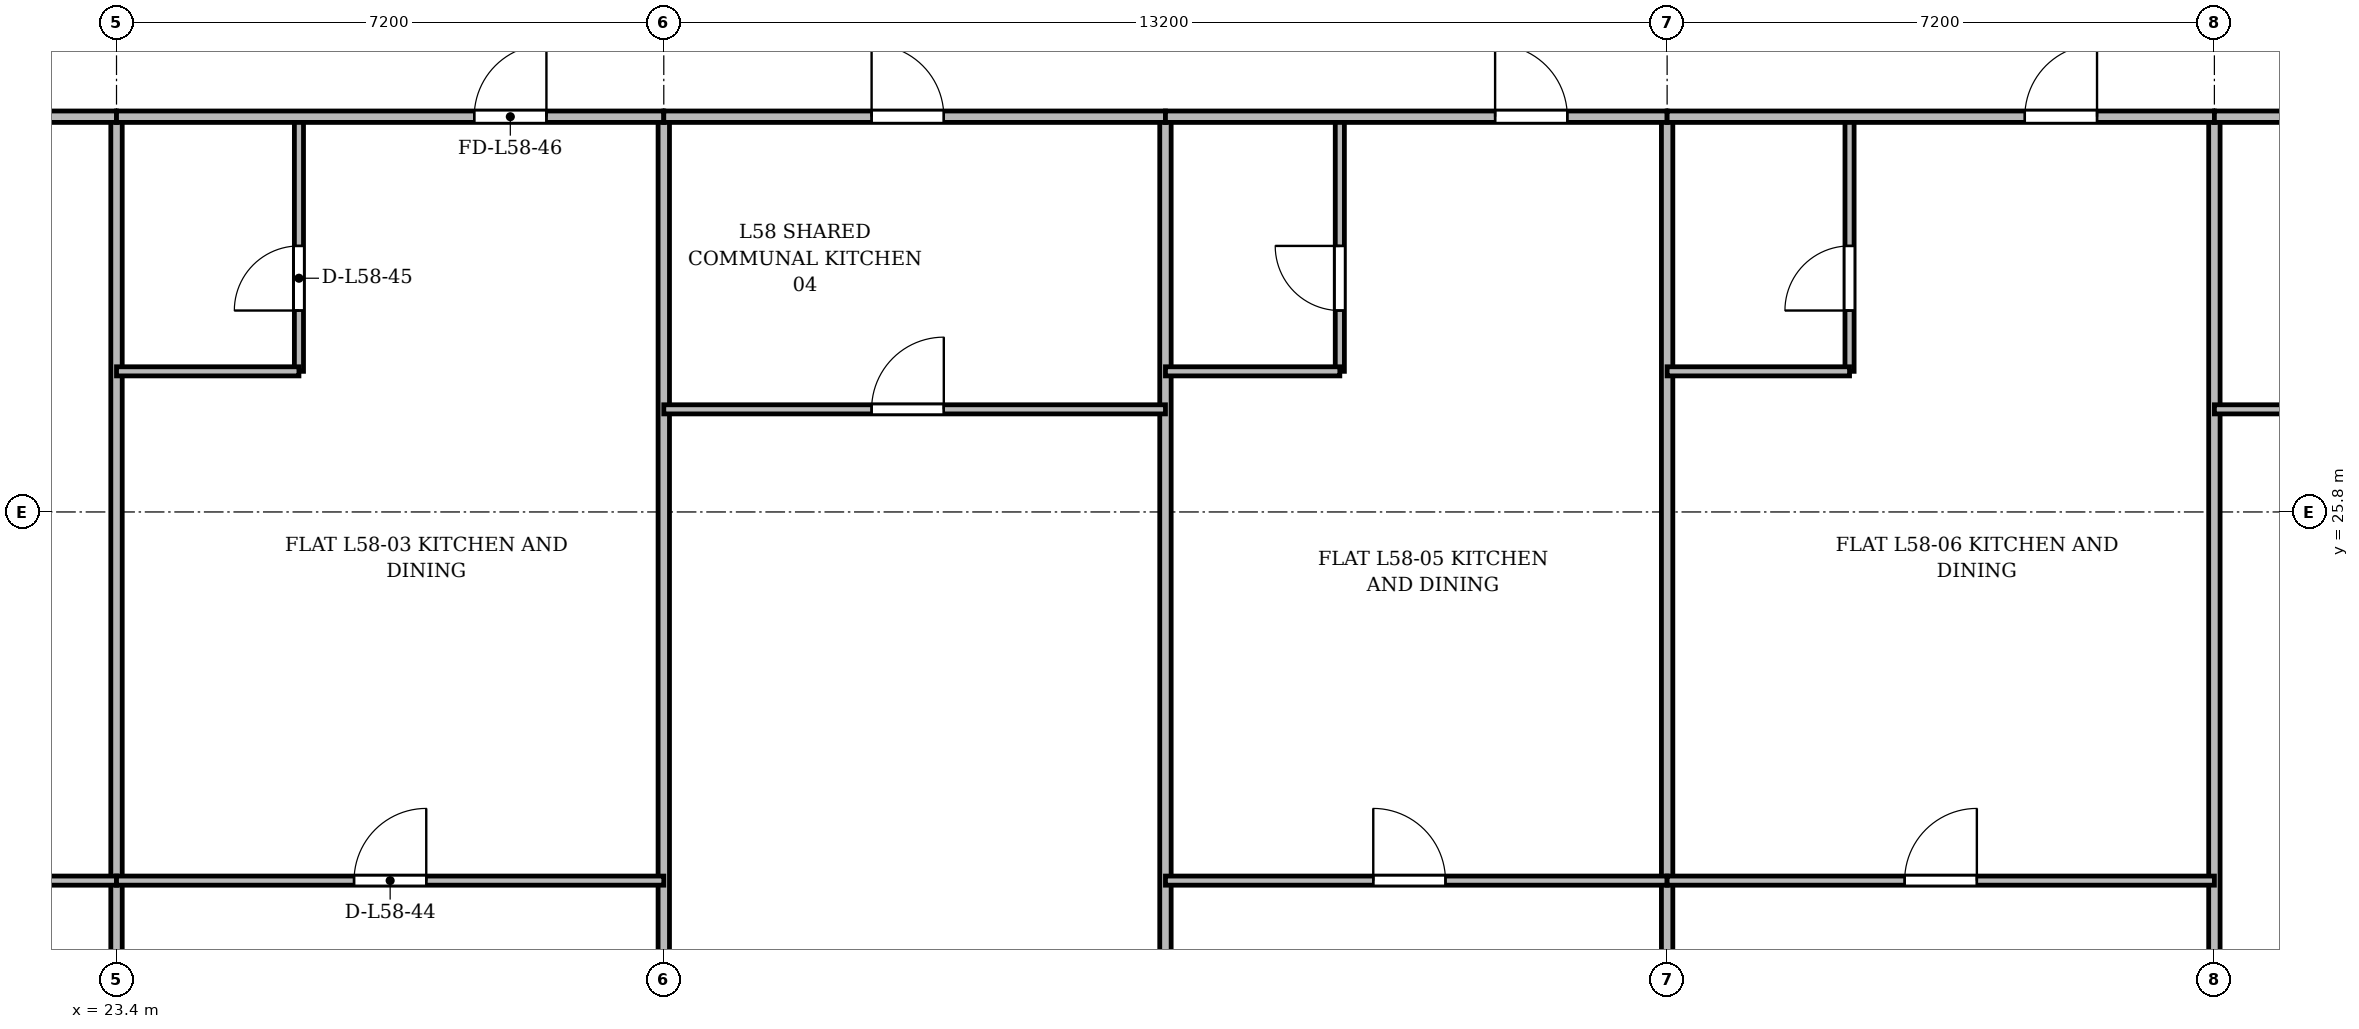
"""IFC4 building model, lengths in metres.
Left out: names, types, materials, properties, quantities, classifications, styles, units other than length and angle.
Written with IfcOpenShell. Run it as: python <this file> out.ifc"""

import sys

from ifc_helpers import new_model, si_unit, direction, frame, frame_2d, origin, place, context, subcontext, project, spatial, rectangle, extrude, source, transform, mapped, element, fill, save


model = new_model("IFC4")
c1 = context("Model", 3, precision=1e-05, world=origin(), true_north=direction((0.0, 1.0)))
c2 = subcontext(c1, "Body", "Model", "MODEL_VIEW")
j1 = project(units=[si_unit("LENGTHUNIT", "METRE"), si_unit("PLANEANGLEUNIT", "RADIAN")], contexts=[c1])
p1 = place(None, origin())
s1 = spatial("IfcSite", under=j1, at=p1, CompositionType="ELEMENT")
p2 = place(p1, origin())
s2 = spatial("IfcBuilding", under=s1, at=p2, CompositionType="ELEMENT")
p3 = place(p2, frame((0.0, 0.0, 222.9)))
s3 = spatial("IfcBuildingStorey", under=s2, at=p3, CompositionType="ELEMENT", Elevation=222.9)
for number, where, z_axis, x_axis in (
    (1, (23.4, 3.625, 0.0), (0.0, 0.0, 1.0), (0.0, 1.0, 0.0)),
    (2, (30.6, 3.625, 0.0), (0.0, 0.0, 1.0), (0.0, 1.0, 0.0)),
):
    element("IfcWall", number, at=place(p3, frame(where, z_axis=z_axis, x_axis=x_axis)), inside=s3, PredefinedType="PARTITIONING", context=c2, shape_type="SweptSolid", body=[
        extrude(rectangle(XDim=27.375, YDim=0.15, at=frame_2d((13.688, 0.0))), origin(), (0.0, 0.0, 1.0), 2.86),
    ])
p4 = place(p3, frame((37.2, 3.625, 0.0), z_axis=(0.0, 0.0, 1.0), x_axis=(0.0, 1.0, 0.0)))
e3 = element("IfcWall", 3, at=p4, inside=s3, PredefinedType="PARTITIONING", context=c2, shape_type="SweptSolid", body=[
    extrude(rectangle(XDim=27.375, YDim=0.15, at=frame_2d((13.688, 0.0))), origin(), (0.0, 0.0, 1.0), 2.91),
])
for number, where, z_axis, x_axis in (
    (4, (43.8, 3.625, 0.0), (0.0, 0.0, 1.0), (0.0, 1.0, 0.0)),
    (5, (51.0, 3.625, 0.0), (0.0, 0.0, 1.0), (0.0, 1.0, 0.0)),
):
    element("IfcWall", number, at=place(p3, frame(where, z_axis=z_axis, x_axis=x_axis)), inside=s3, PredefinedType="PARTITIONING", context=c2, shape_type="SweptSolid", body=[
        extrude(rectangle(XDim=27.375, YDim=0.15, at=frame_2d((13.688, 0.0))), origin(), (0.0, 0.0, 1.0), 2.86),
    ])
p5 = place(p3, frame((15.6, 20.95, 0.0), z_axis=(0.0, 0.0, 1.0), x_axis=(1.0, 0.0, 0.0)))
e6 = element("IfcWall", 6, at=p5, inside=s3, PredefinedType="PARTITIONING", context=c2, shape_type="SweptSolid", body=[
    extrude(rectangle(XDim=7.8, YDim=0.12, at=frame_2d((3.9, 0.0))), origin(), (0.0, 0.0, 1.0), 2.86),
])
p6 = place(p5, frame((3.333, 0.0, 0.0)))
e7 = element("IfcOpeningElement", 7, at=p6, cuts=e6, PredefinedType="OPENING", context=c2, shape_type="SweptSolid", body=[
    extrude(rectangle(XDim=0.95, YDim=2.15, at=frame_2d((0.475, 1.075))), frame((0.0, 0.07, 0.0), z_axis=(0.0, -1.0, 0.0), x_axis=(1.0, 0.0, 0.0)), (0.0, 0.0, 1.0), 0.14),
])
p7 = place(p3, frame((15.6, 31.0, 0.0), z_axis=(0.0, 0.0, 1.0), x_axis=(1.0, 0.0, 0.0)))
e8 = element("IfcWall", 8, at=p7, inside=s3, PredefinedType="PARTITIONING", context=c2, shape_type="SweptSolid", body=[
    extrude(rectangle(XDim=7.8, YDim=0.15, at=frame_2d((3.9, 0.0))), origin(), (0.0, 0.0, 1.0), 2.86),
])
p8 = place(p7, frame((5.172, 0.0, 0.0)))
e9 = element("IfcOpeningElement", 9, at=p8, cuts=e8, PredefinedType="OPENING", context=c2, shape_type="SweptSolid", body=[
    extrude(rectangle(XDim=0.95, YDim=2.15, at=frame_2d((0.475, 1.075))), frame((0.0, 0.085, 0.0), z_axis=(0.0, -1.0, 0.0), x_axis=(1.0, 0.0, 0.0)), (0.0, 0.0, 1.0), 0.17),
])
p9 = place(p3, frame((23.4, 20.95, 0.0), z_axis=(0.0, 0.0, 1.0), x_axis=(1.0, 0.0, 0.0)))
e10 = element("IfcWall", 10, at=p9, inside=s3, PredefinedType="PARTITIONING", context=c2, shape_type="SweptSolid", body=[
    extrude(rectangle(XDim=7.2, YDim=0.12, at=frame_2d((3.6, 0.0))), origin(), (0.0, 0.0, 1.0), 2.86),
])
p10 = place(p9, frame((3.125, 0.0, 0.0)))
e11 = element("IfcOpeningElement", 11, at=p10, cuts=e10, PredefinedType="OPENING", context=c2, shape_type="SweptSolid", body=[
    extrude(rectangle(XDim=0.95, YDim=2.15, at=frame_2d((0.475, 1.075))), frame((0.0, 0.07, 0.0), z_axis=(0.0, -1.0, 0.0), x_axis=(1.0, 0.0, 0.0)), (0.0, 0.0, 1.0), 0.14),
])
p11 = place(p3, frame((25.8, 27.65, 0.0), z_axis=(0.0, 0.0, 1.0), x_axis=(0.0, 1.0, 0.0)))
e12 = element("IfcWall", 12, at=p11, inside=s3, PredefinedType="PARTITIONING", context=c2, shape_type="SweptSolid", body=[
    extrude(rectangle(XDim=3.35, YDim=0.12, at=frame_2d((1.675, 0.0))), origin(), (0.0, 0.0, 1.0), 3.36),
])
p12 = place(p11, frame((0.8, 0.0, 0.0)))
e13 = element("IfcOpeningElement", 13, at=p12, cuts=e12, PredefinedType="OPENING", context=c2, shape_type="SweptSolid", body=[
    extrude(rectangle(XDim=0.85, YDim=2.1, at=frame_2d((0.425, 1.05))), frame((0.0, 0.07, 0.0), z_axis=(0.0, -1.0, 0.0), x_axis=(1.0, 0.0, 0.0)), (0.0, 0.0, 1.0), 0.14),
])
p13 = place(p3, frame((23.4, 27.65, 0.0), z_axis=(0.0, 0.0, 1.0), x_axis=(1.0, 0.0, 0.0)))
e14 = element("IfcWall", 14, at=p13, inside=s3, PredefinedType="PARTITIONING", context=c2, shape_type="SweptSolid", body=[
    extrude(rectangle(XDim=2.4, YDim=0.12, at=frame_2d((1.2, 0.0))), origin(), (0.0, 0.0, 1.0), 2.86),
])
p14 = place(p3, frame((23.4, 31.0, 0.0), z_axis=(0.0, 0.0, 1.0), x_axis=(1.0, 0.0, 0.0)))
e15 = element("IfcWall", 15, at=p14, inside=s3, PredefinedType="PARTITIONING", context=c2, shape_type="SweptSolid", body=[
    extrude(rectangle(XDim=7.2, YDim=0.15, at=frame_2d((3.6, 0.0))), origin(), (0.0, 0.0, 1.0), 2.86),
])
p15 = place(p14, frame((4.706, 0.0, 0.0)))
e16 = element("IfcOpeningElement", 16, at=p15, cuts=e15, PredefinedType="OPENING", context=c2, shape_type="SweptSolid", body=[
    extrude(rectangle(XDim=0.95, YDim=2.15, at=frame_2d((0.475, 1.075))), frame((0.0, 0.085, 0.0), z_axis=(0.0, -1.0, 0.0), x_axis=(1.0, 0.0, 0.0)), (0.0, 0.0, 1.0), 0.17),
])
p16 = place(p3, frame((30.6, 31.0, 0.0), z_axis=(0.0, 0.0, 1.0), x_axis=(1.0, 0.0, 0.0)))
e17 = element("IfcWall", 17, at=p16, inside=s3, PredefinedType="PARTITIONING", context=c2, shape_type="SweptSolid", body=[
    extrude(rectangle(XDim=6.6, YDim=0.15, at=frame_2d((3.3, 0.0))), origin(), (0.0, 0.0, 1.0), 2.86),
])
p17 = place(p16, frame((2.734, 0.0, 0.0)))
e18 = element("IfcOpeningElement", 18, at=p17, cuts=e17, PredefinedType="OPENING", context=c2, shape_type="SweptSolid", body=[
    extrude(rectangle(XDim=0.95, YDim=2.15, at=frame_2d((0.475, 1.075))), frame((0.0, 0.085, 0.0), z_axis=(0.0, -1.0, 0.0), x_axis=(1.0, 0.0, 0.0)), (0.0, 0.0, 1.0), 0.17),
])
p18 = place(p3, frame((30.6, 27.15, 0.0), z_axis=(0.0, 0.0, 1.0), x_axis=(1.0, 0.0, 0.0)))
e19 = element("IfcWall", 19, at=p18, inside=s3, PredefinedType="PARTITIONING", context=c2, shape_type="SweptSolid", body=[
    extrude(rectangle(XDim=6.6, YDim=0.12, at=frame_2d((3.3, 0.0))), origin(), (0.0, 0.0, 1.0), 2.86),
])
p19 = place(p18, frame((2.734, 0.0, 0.0)))
e20 = element("IfcOpeningElement", 20, at=p19, cuts=e19, PredefinedType="OPENING", context=c2, shape_type="SweptSolid", body=[
    extrude(rectangle(XDim=0.95, YDim=2.15, at=frame_2d((0.475, 1.075))), frame((0.0, 0.07, 0.0), z_axis=(0.0, -1.0, 0.0), x_axis=(1.0, 0.0, 0.0)), (0.0, 0.0, 1.0), 0.14),
])
p20 = place(p3, frame((37.2, 20.95, 0.0), z_axis=(0.0, 0.0, 1.0), x_axis=(1.0, 0.0, 0.0)))
e21 = element("IfcWall", 21, at=p20, inside=s3, PredefinedType="PARTITIONING", context=c2, shape_type="SweptSolid", body=[
    extrude(rectangle(XDim=6.6, YDim=0.12, at=frame_2d((3.3, 0.0))), origin(), (0.0, 0.0, 1.0), 2.86),
])
p21 = place(p20, frame((2.734, 0.0, 0.0)))
e22 = element("IfcOpeningElement", 22, at=p21, cuts=e21, PredefinedType="OPENING", context=c2, shape_type="SweptSolid", body=[
    extrude(rectangle(XDim=0.95, YDim=2.15, at=frame_2d((0.475, 1.075))), frame((0.0, 0.07, 0.0), z_axis=(0.0, -1.0, 0.0), x_axis=(1.0, 0.0, 0.0)), (0.0, 0.0, 1.0), 0.14),
])
p22 = place(p3, frame((39.494, 27.65, 0.0), z_axis=(0.0, 0.0, 1.0), x_axis=(0.0, 1.0, 0.0)))
e23 = element("IfcWall", 23, at=p22, inside=s3, PredefinedType="PARTITIONING", context=c2, shape_type="SweptSolid", body=[
    extrude(rectangle(XDim=3.35, YDim=0.12, at=frame_2d((1.675, 0.0))), origin(), (0.0, 0.0, 1.0), 3.36),
])
p23 = place(p22, frame((0.8, 0.0, 0.0)))
e24 = element("IfcOpeningElement", 24, at=p23, cuts=e23, PredefinedType="OPENING", context=c2, shape_type="SweptSolid", body=[
    extrude(rectangle(XDim=0.85, YDim=2.1, at=frame_2d((0.425, 1.05))), frame((0.0, 0.07, 0.0), z_axis=(0.0, -1.0, 0.0), x_axis=(1.0, 0.0, 0.0)), (0.0, 0.0, 1.0), 0.14),
])
p24 = place(p3, frame((37.2, 27.65, 0.0), z_axis=(0.0, 0.0, 1.0), x_axis=(1.0, 0.0, 0.0)))
e25 = element("IfcWall", 25, at=p24, inside=s3, PredefinedType="PARTITIONING", context=c2, shape_type="SweptSolid", body=[
    extrude(rectangle(XDim=2.294, YDim=0.12, at=frame_2d((1.147, 0.0))), origin(), (0.0, 0.0, 1.0), 3.36),
])
p25 = place(p3, frame((37.2, 31.0, 0.0), z_axis=(0.0, 0.0, 1.0), x_axis=(1.0, 0.0, 0.0)))
e26 = element("IfcWall", 26, at=p25, inside=s3, PredefinedType="PARTITIONING", context=c2, shape_type="SweptSolid", body=[
    extrude(rectangle(XDim=6.6, YDim=0.15, at=frame_2d((3.3, 0.0))), origin(), (0.0, 0.0, 1.0), 2.86),
])
p26 = place(p25, frame((4.337, 0.0, 0.0)))
e27 = element("IfcOpeningElement", 27, at=p26, cuts=e26, PredefinedType="OPENING", context=c2, shape_type="SweptSolid", body=[
    extrude(rectangle(XDim=0.95, YDim=2.15, at=frame_2d((0.475, 1.075))), frame((0.0, 0.085, 0.0), z_axis=(0.0, -1.0, 0.0), x_axis=(1.0, 0.0, 0.0)), (0.0, 0.0, 1.0), 0.17),
])
p27 = place(p3, frame((43.8, 20.95, 0.0), z_axis=(0.0, 0.0, 1.0), x_axis=(1.0, 0.0, 0.0)))
e28 = element("IfcWall", 28, at=p27, inside=s3, PredefinedType="PARTITIONING", context=c2, shape_type="SweptSolid", body=[
    extrude(rectangle(XDim=7.2, YDim=0.12, at=frame_2d((3.6, 0.0))), origin(), (0.0, 0.0, 1.0), 2.86),
])
p28 = place(p27, frame((3.125, 0.0, 0.0)))
e29 = element("IfcOpeningElement", 29, at=p28, cuts=e28, PredefinedType="OPENING", context=c2, shape_type="SweptSolid", body=[
    extrude(rectangle(XDim=0.95, YDim=2.15, at=frame_2d((0.475, 1.075))), frame((0.0, 0.07, 0.0), z_axis=(0.0, -1.0, 0.0), x_axis=(1.0, 0.0, 0.0)), (0.0, 0.0, 1.0), 0.14),
])
p29 = place(p3, frame((46.2, 27.65, 0.0), z_axis=(0.0, 0.0, 1.0), x_axis=(0.0, 1.0, 0.0)))
e30 = element("IfcWall", 30, at=p29, inside=s3, PredefinedType="PARTITIONING", context=c2, shape_type="SweptSolid", body=[
    extrude(rectangle(XDim=3.35, YDim=0.12, at=frame_2d((1.675, 0.0))), origin(), (0.0, 0.0, 1.0), 3.36),
])
p30 = place(p29, frame((0.8, 0.0, 0.0)))
e31 = element("IfcOpeningElement", 31, at=p30, cuts=e30, PredefinedType="OPENING", context=c2, shape_type="SweptSolid", body=[
    extrude(rectangle(XDim=0.85, YDim=2.1, at=frame_2d((0.425, 1.05))), frame((0.0, 0.07, 0.0), z_axis=(0.0, -1.0, 0.0), x_axis=(1.0, 0.0, 0.0)), (0.0, 0.0, 1.0), 0.14),
])
p31 = place(p3, frame((43.8, 27.65, 0.0), z_axis=(0.0, 0.0, 1.0), x_axis=(1.0, 0.0, 0.0)))
e32 = element("IfcWall", 32, at=p31, inside=s3, PredefinedType="PARTITIONING", context=c2, shape_type="SweptSolid", body=[
    extrude(rectangle(XDim=2.4, YDim=0.12, at=frame_2d((1.2, 0.0))), origin(), (0.0, 0.0, 1.0), 2.86),
])
p32 = place(p3, frame((43.8, 31.0, 0.0), z_axis=(0.0, 0.0, 1.0), x_axis=(1.0, 0.0, 0.0)))
e33 = element("IfcWall", 33, at=p32, inside=s3, PredefinedType="PARTITIONING", context=c2, shape_type="SweptSolid", body=[
    extrude(rectangle(XDim=7.2, YDim=0.15, at=frame_2d((3.6, 0.0))), origin(), (0.0, 0.0, 1.0), 2.86),
])
p33 = place(p32, frame((4.706, 0.0, 0.0)))
e34 = element("IfcOpeningElement", 34, at=p33, cuts=e33, PredefinedType="OPENING", context=c2, shape_type="SweptSolid", body=[
    extrude(rectangle(XDim=0.95, YDim=2.15, at=frame_2d((0.475, 1.075))), frame((0.0, 0.085, 0.0), z_axis=(0.0, -1.0, 0.0), x_axis=(1.0, 0.0, 0.0)), (0.0, 0.0, 1.0), 0.17),
])
p34 = place(p3, frame((51.0, 31.0, 0.0), z_axis=(0.0, 0.0, 1.0), x_axis=(1.0, 0.0, 0.0)))
e35 = element("IfcWall", 35, at=p34, inside=s3, PredefinedType="PARTITIONING", context=c2, shape_type="SweptSolid", body=[
    extrude(rectangle(XDim=7.8, YDim=0.15, at=frame_2d((3.9, 0.0))), origin(), (0.0, 0.0, 1.0), 2.86),
])
p35 = place(p34, frame((3.333, 0.0, 0.0)))
e36 = element("IfcOpeningElement", 36, at=p35, cuts=e35, PredefinedType="OPENING", context=c2, shape_type="SweptSolid", body=[
    extrude(rectangle(XDim=0.95, YDim=2.15, at=frame_2d((0.475, 1.075))), frame((0.0, 0.085, 0.0), z_axis=(0.0, -1.0, 0.0), x_axis=(1.0, 0.0, 0.0)), (0.0, 0.0, 1.0), 0.17),
])
p36 = place(p3, frame((51.0, 27.15, 0.0), z_axis=(0.0, 0.0, 1.0), x_axis=(1.0, 0.0, 0.0)))
e37 = element("IfcWall", 37, at=p36, inside=s3, PredefinedType="PARTITIONING", context=c2, shape_type="SweptSolid", body=[
    extrude(rectangle(XDim=7.8, YDim=0.12, at=frame_2d((3.9, 0.0))), origin(), (0.0, 0.0, 1.0), 2.86),
])
p37 = place(p36, frame((3.333, 0.0, 0.0)))
e38 = element("IfcOpeningElement", 38, at=p37, cuts=e37, PredefinedType="OPENING", context=c2, shape_type="SweptSolid", body=[
    extrude(rectangle(XDim=0.95, YDim=2.15, at=frame_2d((0.475, 1.075))), frame((0.0, 0.07, 0.0), z_axis=(0.0, -1.0, 0.0), x_axis=(1.0, 0.0, 0.0)), (0.0, 0.0, 1.0), 0.14),
])
m1 = source(origin(), c2, "Body", "SweptSolid", [
    extrude(rectangle(XDim=0.95, YDim=2.15, at=frame_2d((0.475, 1.075))), frame((0.0, 0.025, 0.0), z_axis=(0.0, -1.0, 0.0), x_axis=(1.0, 0.0, 0.0)), (0.0, 0.0, 1.0), 0.05),
])
p38 = place(p10, origin())
e39 = element("IfcDoor", 39, at=p38, inside=s3, OperationType="SINGLE_SWING_RIGHT", PredefinedType="DOOR", context=c2, shape_type="MappedRepresentation", body=[
    mapped(m1, transform((0.0, 0.0, 0.0), x_axis=(1.0, 0.0, 0.0), y_axis=(0.0, 1.0, 0.0), z_axis=(0.0, 0.0, 1.0), scale=1.0)),
])
fill(e11, e39)
m2 = source(origin(), c2, "Body", "SweptSolid", [
    extrude(rectangle(XDim=0.85, YDim=2.1, at=frame_2d((0.425, 1.05))), frame((0.0, 0.025, 0.0), z_axis=(0.0, -1.0, 0.0), x_axis=(1.0, 0.0, 0.0)), (0.0, 0.0, 1.0), 0.05),
])
p39 = place(p12, origin())
e40 = element("IfcDoor", 40, at=p39, inside=s3, OperationType="SINGLE_SWING_LEFT", PredefinedType="DOOR", context=c2, shape_type="MappedRepresentation", body=[
    mapped(m2, transform((0.0, 0.0, 0.0), x_axis=(1.0, 0.0, 0.0), y_axis=(0.0, 1.0, 0.0), z_axis=(0.0, 0.0, 1.0), scale=1.0)),
])
fill(e13, e40)
p40 = place(p15, origin())
e41 = element("IfcDoor", 41, at=p40, inside=s3, OperationType="SINGLE_SWING_RIGHT", PredefinedType="DOOR", context=c2, shape_type="MappedRepresentation", body=[
    mapped(m1, transform((0.0, 0.0, 0.0), x_axis=(1.0, 0.0, 0.0), y_axis=(0.0, 1.0, 0.0), z_axis=(0.0, 0.0, 1.0), scale=1.0)),
])
fill(e16, e41)
p41 = place(p17, origin())
e42 = element("IfcDoor", 42, at=p41, inside=s3, OperationType="SINGLE_SWING_LEFT", PredefinedType="DOOR", context=c2, shape_type="MappedRepresentation", body=[
    mapped(m1, transform((0.0, 0.0, 0.0), x_axis=(1.0, 0.0, 0.0), y_axis=(0.0, 1.0, 0.0), z_axis=(0.0, 0.0, 1.0), scale=1.0)),
])
fill(e18, e42)
p42 = place(p19, origin())
e43 = element("IfcDoor", 43, at=p42, inside=s3, OperationType="SINGLE_SWING_RIGHT", PredefinedType="DOOR", context=c2, shape_type="MappedRepresentation", body=[
    mapped(m1, transform((0.0, 0.0, 0.0), x_axis=(1.0, 0.0, 0.0), y_axis=(0.0, 1.0, 0.0), z_axis=(0.0, 0.0, 1.0), scale=1.0)),
])
fill(e20, e43)
p43 = place(p21, origin())
e44 = element("IfcDoor", 44, at=p43, inside=s3, OperationType="SINGLE_SWING_LEFT", PredefinedType="DOOR", context=c2, shape_type="MappedRepresentation", body=[
    mapped(m1, transform((0.0, 0.0, 0.0), x_axis=(1.0, 0.0, 0.0), y_axis=(0.0, 1.0, 0.0), z_axis=(0.0, 0.0, 1.0), scale=1.0)),
])
fill(e22, e44)
p44 = place(p23, origin())
e45 = element("IfcDoor", 45, at=p44, inside=s3, OperationType="SINGLE_SWING_RIGHT", PredefinedType="DOOR", context=c2, shape_type="MappedRepresentation", body=[
    mapped(m2, transform((0.0, 0.0, 0.0), x_axis=(1.0, 0.0, 0.0), y_axis=(0.0, 1.0, 0.0), z_axis=(0.0, 0.0, 1.0), scale=1.0)),
])
fill(e24, e45)
p45 = place(p26, origin())
e46 = element("IfcDoor", 46, at=p45, inside=s3, OperationType="SINGLE_SWING_LEFT", PredefinedType="DOOR", context=c2, shape_type="MappedRepresentation", body=[
    mapped(m1, transform((0.0, 0.0, 0.0), x_axis=(1.0, 0.0, 0.0), y_axis=(0.0, 1.0, 0.0), z_axis=(0.0, 0.0, 1.0), scale=1.0)),
])
fill(e27, e46)
p46 = place(p28, origin())
e47 = element("IfcDoor", 47, at=p46, inside=s3, OperationType="SINGLE_SWING_RIGHT", PredefinedType="DOOR", context=c2, shape_type="MappedRepresentation", body=[
    mapped(m1, transform((0.0, 0.0, 0.0), x_axis=(1.0, 0.0, 0.0), y_axis=(0.0, 1.0, 0.0), z_axis=(0.0, 0.0, 1.0), scale=1.0)),
])
fill(e29, e47)
p47 = place(p30, origin())
e48 = element("IfcDoor", 48, at=p47, inside=s3, OperationType="SINGLE_SWING_LEFT", PredefinedType="DOOR", context=c2, shape_type="MappedRepresentation", body=[
    mapped(m2, transform((0.0, 0.0, 0.0), x_axis=(1.0, 0.0, 0.0), y_axis=(0.0, 1.0, 0.0), z_axis=(0.0, 0.0, 1.0), scale=1.0)),
])
fill(e31, e48)
p48 = place(p33, origin())
e49 = element("IfcDoor", 49, at=p48, inside=s3, OperationType="SINGLE_SWING_RIGHT", PredefinedType="DOOR", context=c2, shape_type="MappedRepresentation", body=[
    mapped(m1, transform((0.0, 0.0, 0.0), x_axis=(1.0, 0.0, 0.0), y_axis=(0.0, 1.0, 0.0), z_axis=(0.0, 0.0, 1.0), scale=1.0)),
])
fill(e34, e49)
save(model, sys.argv[1])
